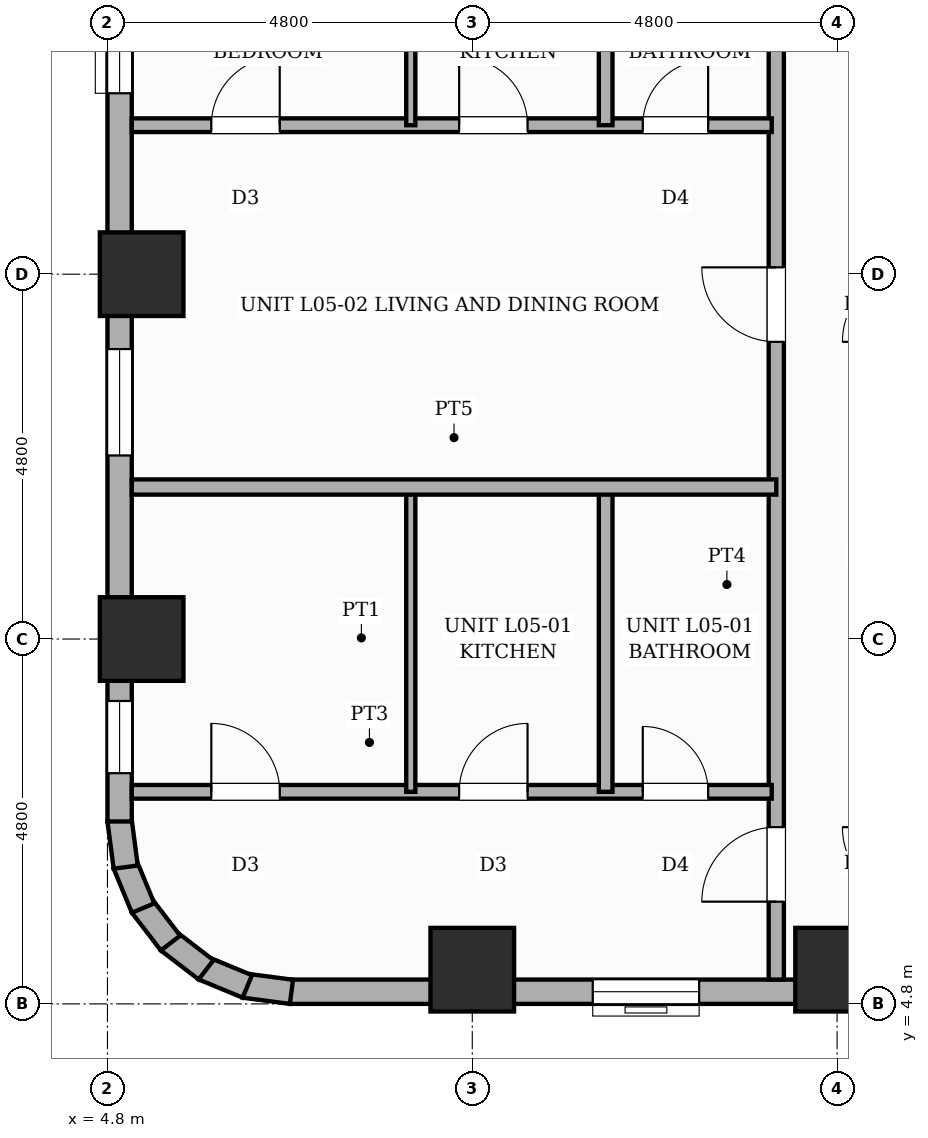
"""IFC4 building model, lengths in metres.
Left out: names, types, materials, properties, quantities, classifications, styles, units other than length and angle.
Written with IfcOpenShell. Run it as: python <this file> out.ifc"""

import sys

from ifc_helpers import new_model, si_unit, direction, frame, frame_2d, origin, origin_2d, place, context, subcontext, project, spatial, rectangle, extrude, element, fill, save


model = new_model("IFC4")
c1 = context("Model", 3, precision=1e-05, world=origin(), true_north=direction((0.0, 1.0)))
c2 = subcontext(c1, "Body", "Model", "MODEL_VIEW")
j1 = project(units=[si_unit("LENGTHUNIT", "METRE"), si_unit("PLANEANGLEUNIT", "RADIAN")], contexts=[c1])
p1 = place(None, origin())
s1 = spatial("IfcSite", under=j1, at=p1, CompositionType="ELEMENT")
p2 = place(p1, origin())
s2 = spatial("IfcBuilding", under=s1, at=p2, CompositionType="ELEMENT")
p3 = place(p2, frame((0.0, 0.0, 25.0)))
s3 = spatial("IfcBuildingStorey", under=s2, at=p3, CompositionType="ELEMENT", Elevation=25.0)
for number, where, z_axis, x_axis in (
    (1, (5.25, 9.6, 0.0), (0.0, 0.0, 1.0), (1.0, 0.0, 0.0)),
    (2, (5.25, 14.4, 0.0), (0.0, 0.0, 1.0), (1.0, 0.0, 0.0)),
    (3, (9.6, 5.25, 0.0), (0.0, 0.0, 1.0), (1.0, 0.0, 0.0)),
    (4, (14.4, 5.25, 0.0), (0.0, 0.0, 1.0), (1.0, 0.0, 0.0)),
):
    element("IfcColumn", number, at=place(p3, frame(where, z_axis=z_axis, x_axis=x_axis)), inside=s3, PredefinedType="COLUMN", context=c2, shape_type="SweptSolid", body=[
        extrude(rectangle(XDim=1.1, YDim=1.1, at=origin_2d()), origin(), (0.0, 0.0, 1.0), 3.6),
    ])
p4 = place(p3, frame((21.6, 4.96, 0.0), z_axis=(0.0, 0.0, 1.0), x_axis=(-1.0, 0.0, 0.0)))
e5 = element("IfcWall", 5, at=p4, inside=s3, PredefinedType="STANDARD", context=c2, shape_type="SweptSolid", body=[
    extrude(rectangle(XDim=14.4, YDim=0.32, at=frame_2d((7.2, 0.0))), origin(), (0.0, 0.0, 1.0), 2.53),
])
p5 = place(p4, frame((9.015, 0.0, 0.65)))
e6 = element("IfcOpeningElement", 6, at=p5, cuts=e5, PredefinedType="OPENING", context=c2, shape_type="SweptSolid", body=[
    extrude(rectangle(XDim=1.4, YDim=1.1, at=frame_2d((0.7, 0.55))), frame((0.0, 0.17, 0.0), z_axis=(0.0, -1.0, 0.0), x_axis=(1.0, 0.0, 0.0)), (0.0, 0.0, 1.0), 0.34),
])
p6 = place(p4, frame((0.47, 0.0, 0.45)))
e7 = element("IfcOpeningElement", 7, at=p6, cuts=e5, PredefinedType="OPENING", context=c2, shape_type="SweptSolid", body=[
    extrude(rectangle(XDim=0.95, YDim=1.8, at=frame_2d((0.475, 0.9))), frame((0.0, 0.17, 0.0), z_axis=(0.0, -1.0, 0.0), x_axis=(1.0, 0.0, 0.0)), (0.0, 0.0, 1.0), 0.34),
])
p7 = place(p3, frame((7.221, 4.958, 0.0), z_axis=(0.0, 0.0, 1.0), x_axis=(-0.991447664465, 0.130504898859, 0.0)))
e8 = element("IfcWall", 8, at=p7, inside=s3, PredefinedType="STANDARD", context=c2, shape_type="SweptSolid", body=[
    extrude(rectangle(XDim=0.627, YDim=0.32, at=frame_2d((0.313, 0.0))), origin(), (0.0, 0.0, 1.0), 3.35),
])
p8 = place(p3, frame((6.64, 5.03, 0.0), z_axis=(0.0, 0.0, 1.0), x_axis=(-0.923836271867, 0.382787856107, 0.0)))
e9 = element("IfcWall", 9, at=p8, inside=s3, PredefinedType="STANDARD", context=c2, shape_type="SweptSolid", body=[
    extrude(rectangle(XDim=0.626, YDim=0.32, at=frame_2d((0.313, 0.0))), origin(), (0.0, 0.0, 1.0), 3.35),
])
for number, where, z_axis, x_axis in (
    (10, (6.097, 5.248, 0.0), (0.0, 0.0, 1.0), (-0.793, 0.609, 0.0)),
    (11, (5.63, 5.6, 0.0), (0.0, 0.0, 1.0), (-0.609, 0.793, 0.0)),
):
    element("IfcWall", number, at=place(p3, frame(where, z_axis=z_axis, x_axis=x_axis)), inside=s3, PredefinedType="STANDARD", context=c2, shape_type="SweptSolid", body=[
        extrude(rectangle(XDim=0.627, YDim=0.32, at=frame_2d((0.313, 0.0))), origin(), (0.0, 0.0, 1.0), 3.35),
    ])
p9 = place(p3, frame((5.269, 6.061, 0.0), z_axis=(0.0, 0.0, 1.0), x_axis=(-0.382787856107, 0.923836271867, 0.0)))
e12 = element("IfcWall", 12, at=p9, inside=s3, PredefinedType="STANDARD", context=c2, shape_type="SweptSolid", body=[
    extrude(rectangle(XDim=0.626, YDim=0.32, at=frame_2d((0.313, 0.0))), origin(), (0.0, 0.0, 1.0), 3.35),
])
p10 = place(p3, frame((5.04, 6.6, 0.0), z_axis=(0.0, 0.0, 1.0), x_axis=(-0.130504898859, 0.991447664465, 0.0)))
e13 = element("IfcWall", 13, at=p10, inside=s3, PredefinedType="STANDARD", context=c2, shape_type="SweptSolid", body=[
    extrude(rectangle(XDim=0.627, YDim=0.32, at=frame_2d((0.313, 0.0))), origin(), (0.0, 0.0, 1.0), 3.35),
])
p11 = place(p3, frame((4.96, 7.2, 0.0), z_axis=(0.0, 0.0, 1.0), x_axis=(0.0, 1.0, 0.0)))
e14 = element("IfcWall", 14, at=p11, inside=s3, PredefinedType="STANDARD", context=c2, shape_type="SweptSolid", body=[
    extrude(rectangle(XDim=38.4, YDim=0.32, at=frame_2d((19.2, 0.0))), origin(), (0.0, 0.0, 1.0), 2.53),
])
p12 = place(p11, frame((0.635, 0.0, 0.45)))
e15 = element("IfcOpeningElement", 15, at=p12, cuts=e14, PredefinedType="OPENING", context=c2, shape_type="SweptSolid", body=[
    extrude(rectangle(XDim=0.95, YDim=1.8, at=frame_2d((0.475, 0.9))), frame((0.0, 0.17, 0.0), z_axis=(0.0, -1.0, 0.0), x_axis=(1.0, 0.0, 0.0)), (0.0, 0.0, 1.0), 0.34),
])
p13 = place(p11, frame((9.58, 0.0, 0.65)))
e16 = element("IfcOpeningElement", 16, at=p13, cuts=e14, PredefinedType="OPENING", context=c2, shape_type="SweptSolid", body=[
    extrude(rectangle(XDim=1.4, YDim=1.1, at=frame_2d((0.7, 0.55))), frame((0.0, 0.17, 0.0), z_axis=(0.0, -1.0, 0.0), x_axis=(1.0, 0.0, 0.0)), (0.0, 0.0, 1.0), 0.34),
])
p14 = place(p11, frame((15.04, 0.0, 0.45)))
e17 = element("IfcOpeningElement", 17, at=p14, cuts=e14, PredefinedType="OPENING", context=c2, shape_type="SweptSolid", body=[
    extrude(rectangle(XDim=0.95, YDim=1.8, at=frame_2d((0.475, 0.9))), frame((0.0, 0.17, 0.0), z_axis=(0.0, -1.0, 0.0), x_axis=(1.0, 0.0, 0.0)), (0.0, 0.0, 1.0), 0.34),
])
p15 = place(p11, frame((4.815, 0.0, 0.65)))
e18 = element("IfcOpeningElement", 18, at=p15, cuts=e14, PredefinedType="OPENING", context=c2, shape_type="SweptSolid", body=[
    extrude(rectangle(XDim=1.4, YDim=1.1, at=frame_2d((0.7, 0.55))), frame((0.0, 0.17, 0.0), z_axis=(0.0, -1.0, 0.0), x_axis=(1.0, 0.0, 0.0)), (0.0, 0.0, 1.0), 0.34),
])
p16 = place(p11, frame((12.985, 0.0, 0.65)))
e19 = element("IfcOpeningElement", 19, at=p16, cuts=e14, PredefinedType="OPENING", context=c2, shape_type="SweptSolid", body=[
    extrude(rectangle(XDim=1.4, YDim=1.1, at=frame_2d((0.7, 0.55))), frame((0.0, 0.17, 0.0), z_axis=(0.0, -1.0, 0.0), x_axis=(1.0, 0.0, 0.0)), (0.0, 0.0, 1.0), 0.34),
])
p17 = place(p3, frame((13.6, 5.12, 0.0), z_axis=(0.0, 0.0, 1.0), x_axis=(0.0, 1.0, 0.0)))
e20 = element("IfcWall", 20, at=p17, inside=s3, PredefinedType="PARTITIONING", context=c2, shape_type="SweptSolid", body=[
    extrude(rectangle(XDim=20.63, YDim=0.2, at=frame_2d((10.315, 0.0))), origin(), (0.0, 0.0, 1.0), 3.35),
])
p18 = place(p17, frame((1.025, 0.0, 0.0)))
e21 = element("IfcOpeningElement", 21, at=p18, cuts=e20, PredefinedType="OPENING", context=c2, shape_type="SweptSolid", body=[
    extrude(rectangle(XDim=0.98, YDim=2.18, at=frame_2d((0.49, 1.09))), frame((0.0, 0.11, 0.0), z_axis=(0.0, -1.0, 0.0), x_axis=(1.0, 0.0, 0.0)), (0.0, 0.0, 1.0), 0.22),
])
p19 = place(p17, frame((8.39, 0.0, 0.0)))
e22 = element("IfcOpeningElement", 22, at=p19, cuts=e20, PredefinedType="OPENING", context=c2, shape_type="SweptSolid", body=[
    extrude(rectangle(XDim=0.98, YDim=2.18, at=frame_2d((0.49, 1.09))), frame((0.0, 0.11, 0.0), z_axis=(0.0, -1.0, 0.0), x_axis=(1.0, 0.0, 0.0)), (0.0, 0.0, 1.0), 0.22),
])
p20 = place(p17, frame((14.71, 0.0, 0.0)))
e23 = element("IfcOpeningElement", 23, at=p20, cuts=e20, PredefinedType="OPENING", context=c2, shape_type="SweptSolid", body=[
    extrude(rectangle(XDim=0.98, YDim=2.18, at=frame_2d((0.49, 1.09))), frame((0.0, 0.11, 0.0), z_axis=(0.0, -1.0, 0.0), x_axis=(1.0, 0.0, 0.0)), (0.0, 0.0, 1.0), 0.22),
])
p21 = place(p3, frame((5.12, 7.59, 0.0), z_axis=(0.0, 0.0, 1.0), x_axis=(1.0, 0.0, 0.0)))
e24 = element("IfcWall", 24, at=p21, inside=s3, PredefinedType="PLUMBINGWALL", context=c2, shape_type="SweptSolid", body=[
    extrude(rectangle(XDim=8.42, YDim=0.18, at=frame_2d((4.21, 0.0))), origin(), (0.0, 0.0, 1.0), 3.35),
])
p22 = place(p21, frame((1.046, 0.0, 0.0)))
e25 = element("IfcOpeningElement", 25, at=p22, cuts=e24, PredefinedType="OPENING", context=c2, shape_type="SweptSolid", body=[
    extrude(rectangle(XDim=0.9, YDim=2.15, at=frame_2d((0.45, 1.075))), frame((0.0, 0.1, 0.0), z_axis=(0.0, -1.0, 0.0), x_axis=(1.0, 0.0, 0.0)), (0.0, 0.0, 1.0), 0.2),
])
p23 = place(p21, frame((4.307, 0.0, 0.0)))
e26 = element("IfcOpeningElement", 26, at=p23, cuts=e24, PredefinedType="OPENING", context=c2, shape_type="SweptSolid", body=[
    extrude(rectangle(XDim=0.9, YDim=2.15, at=frame_2d((0.45, 1.075))), frame((0.0, 0.1, 0.0), z_axis=(0.0, -1.0, 0.0), x_axis=(1.0, 0.0, 0.0)), (0.0, 0.0, 1.0), 0.2),
])
p24 = place(p21, frame((6.723, 0.0, 0.0)))
e27 = element("IfcOpeningElement", 27, at=p24, cuts=e24, PredefinedType="OPENING", context=c2, shape_type="SweptSolid", body=[
    extrude(rectangle(XDim=0.86, YDim=2.1, at=frame_2d((0.43, 1.05))), frame((0.0, 0.1, 0.0), z_axis=(0.0, -1.0, 0.0), x_axis=(1.0, 0.0, 0.0)), (0.0, 0.0, 1.0), 0.2),
])
p25 = place(p3, frame((8.791, 7.59, 0.0), z_axis=(0.0, 0.0, 1.0), x_axis=(0.0, 1.0, 0.0)))
e28 = element("IfcWall", 28, at=p25, inside=s3, PredefinedType="PARTITIONING", context=c2, shape_type="SweptSolid", body=[
    extrude(rectangle(XDim=4.05, YDim=0.12, at=frame_2d((2.025, 0.0))), origin(), (0.0, 0.0, 1.0), 3.35),
])
p26 = place(p3, frame((11.355, 7.59, 0.0), z_axis=(0.0, 0.0, 1.0), x_axis=(0.0, 1.0, 0.0)))
e29 = element("IfcWall", 29, at=p26, inside=s3, PredefinedType="PLUMBINGWALL", context=c2, shape_type="SweptSolid", body=[
    extrude(rectangle(XDim=4.05, YDim=0.18, at=frame_2d((2.025, 0.0))), origin(), (0.0, 0.0, 1.0), 3.35),
])
p27 = place(p3, frame((5.12, 11.6, 0.0), z_axis=(0.0, 0.0, 1.0), x_axis=(1.0, 0.0, 0.0)))
e30 = element("IfcWall", 30, at=p27, inside=s3, PredefinedType="SOLIDWALL", context=c2, shape_type="SweptSolid", body=[
    extrude(rectangle(XDim=8.48, YDim=0.2, at=frame_2d((4.24, 0.0))), origin(), (0.0, 0.0, 1.0), 3.35),
])
p28 = place(p3, frame((5.12, 16.36, 0.0), z_axis=(0.0, 0.0, 1.0), x_axis=(1.0, 0.0, 0.0)))
e31 = element("IfcWall", 31, at=p28, inside=s3, PredefinedType="PLUMBINGWALL", context=c2, shape_type="SweptSolid", body=[
    extrude(rectangle(XDim=8.42, YDim=0.18, at=frame_2d((4.21, 0.0))), origin(), (0.0, 0.0, 1.0), 3.35),
])
p29 = place(p28, frame((1.046, 0.0, 0.0)))
e32 = element("IfcOpeningElement", 32, at=p29, cuts=e31, PredefinedType="OPENING", context=c2, shape_type="SweptSolid", body=[
    extrude(rectangle(XDim=0.9, YDim=2.15, at=frame_2d((0.45, 1.075))), frame((0.0, 0.1, 0.0), z_axis=(0.0, -1.0, 0.0), x_axis=(1.0, 0.0, 0.0)), (0.0, 0.0, 1.0), 0.2),
])
p30 = place(p28, frame((4.307, 0.0, 0.0)))
e33 = element("IfcOpeningElement", 33, at=p30, cuts=e31, PredefinedType="OPENING", context=c2, shape_type="SweptSolid", body=[
    extrude(rectangle(XDim=0.9, YDim=2.15, at=frame_2d((0.45, 1.075))), frame((0.0, 0.1, 0.0), z_axis=(0.0, -1.0, 0.0), x_axis=(1.0, 0.0, 0.0)), (0.0, 0.0, 1.0), 0.2),
])
p31 = place(p28, frame((6.723, 0.0, 0.0)))
e34 = element("IfcOpeningElement", 34, at=p31, cuts=e31, PredefinedType="OPENING", context=c2, shape_type="SweptSolid", body=[
    extrude(rectangle(XDim=0.86, YDim=2.1, at=frame_2d((0.43, 1.05))), frame((0.0, 0.1, 0.0), z_axis=(0.0, -1.0, 0.0), x_axis=(1.0, 0.0, 0.0)), (0.0, 0.0, 1.0), 0.2),
])
p32 = place(p3, frame((8.791, 16.36, 0.0), z_axis=(0.0, 0.0, 1.0), x_axis=(0.0, 1.0, 0.0)))
e35 = element("IfcWall", 35, at=p32, inside=s3, PredefinedType="PARTITIONING", context=c2, shape_type="SweptSolid", body=[
    extrude(rectangle(XDim=2.28, YDim=0.12, at=frame_2d((1.14, 0.0))), origin(), (0.0, 0.0, 1.0), 3.35),
])
p33 = place(p3, frame((11.355, 16.36, 0.0), z_axis=(0.0, 0.0, 1.0), x_axis=(0.0, 1.0, 0.0)))
e36 = element("IfcWall", 36, at=p33, inside=s3, PredefinedType="PLUMBINGWALL", context=c2, shape_type="SweptSolid", body=[
    extrude(rectangle(XDim=2.28, YDim=0.18, at=frame_2d((1.14, 0.0))), origin(), (0.0, 0.0, 1.0), 3.35),
])
p34 = place(p5, origin())
e37 = element("IfcWindow", 37, at=p34, inside=s3, PartitioningType="SINGLE_PANEL", PredefinedType="WINDOW", context=c2, shape_type="SweptSolid", body=[
    extrude(rectangle(XDim=1.4, YDim=1.1, at=frame_2d((0.7, 0.55))), frame((0.0, 0.03, 0.0), z_axis=(0.0, -1.0, 0.0), x_axis=(1.0, 0.0, 0.0)), (0.0, 0.0, 1.0), 0.06),
])
fill(e6, e37)
p35 = place(p12, origin())
e38 = element("IfcWindow", 38, at=p35, inside=s3, PartitioningType="SINGLE_PANEL", PredefinedType="WINDOW", context=c2, shape_type="SweptSolid", body=[
    extrude(rectangle(XDim=0.95, YDim=1.8, at=frame_2d((0.475, 0.9))), frame((0.0, 0.03, 0.0), z_axis=(0.0, -1.0, 0.0), x_axis=(1.0, 0.0, 0.0)), (0.0, 0.0, 1.0), 0.06),
])
fill(e15, e38)
p36 = place(p13, origin())
e39 = element("IfcWindow", 39, at=p36, inside=s3, PartitioningType="SINGLE_PANEL", PredefinedType="WINDOW", context=c2, shape_type="SweptSolid", body=[
    extrude(rectangle(XDim=1.4, YDim=1.1, at=frame_2d((0.7, 0.55))), frame((0.0, 0.03, 0.0), z_axis=(0.0, -1.0, 0.0), x_axis=(1.0, 0.0, 0.0)), (0.0, 0.0, 1.0), 0.06),
])
fill(e16, e39)
p37 = place(p15, origin())
e40 = element("IfcWindow", 40, at=p37, inside=s3, PartitioningType="SINGLE_PANEL", PredefinedType="WINDOW", context=c2, shape_type="SweptSolid", body=[
    extrude(rectangle(XDim=1.4, YDim=1.1, at=frame_2d((0.7, 0.55))), frame((0.0, 0.03, 0.0), z_axis=(0.0, -1.0, 0.0), x_axis=(1.0, 0.0, 0.0)), (0.0, 0.0, 1.0), 0.06),
])
fill(e18, e40)
p38 = place(p18, origin())
e41 = element("IfcDoor", 41, at=p38, inside=s3, OperationType="SINGLE_SWING_LEFT", PredefinedType="DOOR", context=c2, shape_type="SweptSolid", body=[
    extrude(rectangle(XDim=0.98, YDim=2.18, at=frame_2d((0.49, 1.09))), frame((0.0, 0.025, 0.0), z_axis=(0.0, -1.0, 0.0), x_axis=(1.0, 0.0, 0.0)), (0.0, 0.0, 1.0), 0.05),
])
fill(e21, e41)
p39 = place(p22, origin())
e42 = element("IfcDoor", 42, at=p39, inside=s3, OperationType="SINGLE_SWING_LEFT", PredefinedType="DOOR", context=c2, shape_type="SweptSolid", body=[
    extrude(rectangle(XDim=0.9, YDim=2.15, at=frame_2d((0.45, 1.075))), frame((0.0, 0.025, 0.0), z_axis=(0.0, -1.0, 0.0), x_axis=(1.0, 0.0, 0.0)), (0.0, 0.0, 1.0), 0.05),
])
fill(e25, e42)
p40 = place(p23, origin())
e43 = element("IfcDoor", 43, at=p40, inside=s3, OperationType="SINGLE_SWING_RIGHT", PredefinedType="DOOR", context=c2, shape_type="SweptSolid", body=[
    extrude(rectangle(XDim=0.9, YDim=2.15, at=frame_2d((0.45, 1.075))), frame((0.0, 0.025, 0.0), z_axis=(0.0, -1.0, 0.0), x_axis=(1.0, 0.0, 0.0)), (0.0, 0.0, 1.0), 0.05),
])
fill(e26, e43)
p41 = place(p24, origin())
e44 = element("IfcDoor", 44, at=p41, inside=s3, OperationType="SINGLE_SWING_LEFT", PredefinedType="DOOR", context=c2, shape_type="SweptSolid", body=[
    extrude(rectangle(XDim=0.86, YDim=2.1, at=frame_2d((0.43, 1.05))), frame((0.0, 0.025, 0.0), z_axis=(0.0, -1.0, 0.0), x_axis=(1.0, 0.0, 0.0)), (0.0, 0.0, 1.0), 0.05),
])
fill(e27, e44)
p42 = place(p19, origin())
e45 = element("IfcDoor", 45, at=p42, inside=s3, OperationType="SINGLE_SWING_RIGHT", PredefinedType="DOOR", context=c2, shape_type="SweptSolid", body=[
    extrude(rectangle(XDim=0.98, YDim=2.18, at=frame_2d((0.49, 1.09))), frame((0.0, 0.025, 0.0), z_axis=(0.0, -1.0, 0.0), x_axis=(1.0, 0.0, 0.0)), (0.0, 0.0, 1.0), 0.05),
])
fill(e22, e45)
p43 = place(p29, origin())
e46 = element("IfcDoor", 46, at=p43, inside=s3, OperationType="SINGLE_SWING_RIGHT", PredefinedType="DOOR", context=c2, shape_type="SweptSolid", body=[
    extrude(rectangle(XDim=0.9, YDim=2.15, at=frame_2d((0.45, 1.075))), frame((0.0, 0.025, 0.0), z_axis=(0.0, -1.0, 0.0), x_axis=(1.0, 0.0, 0.0)), (0.0, 0.0, 1.0), 0.05),
])
fill(e32, e46)
p44 = place(p30, origin())
e47 = element("IfcDoor", 47, at=p44, inside=s3, OperationType="SINGLE_SWING_LEFT", PredefinedType="DOOR", context=c2, shape_type="SweptSolid", body=[
    extrude(rectangle(XDim=0.9, YDim=2.15, at=frame_2d((0.45, 1.075))), frame((0.0, 0.025, 0.0), z_axis=(0.0, -1.0, 0.0), x_axis=(1.0, 0.0, 0.0)), (0.0, 0.0, 1.0), 0.05),
])
fill(e33, e47)
p45 = place(p31, origin())
e48 = element("IfcDoor", 48, at=p45, inside=s3, OperationType="SINGLE_SWING_RIGHT", PredefinedType="DOOR", context=c2, shape_type="SweptSolid", body=[
    extrude(rectangle(XDim=0.86, YDim=2.1, at=frame_2d((0.43, 1.05))), frame((0.0, 0.025, 0.0), z_axis=(0.0, -1.0, 0.0), x_axis=(1.0, 0.0, 0.0)), (0.0, 0.0, 1.0), 0.05),
])
fill(e34, e48)
save(model, sys.argv[1])
